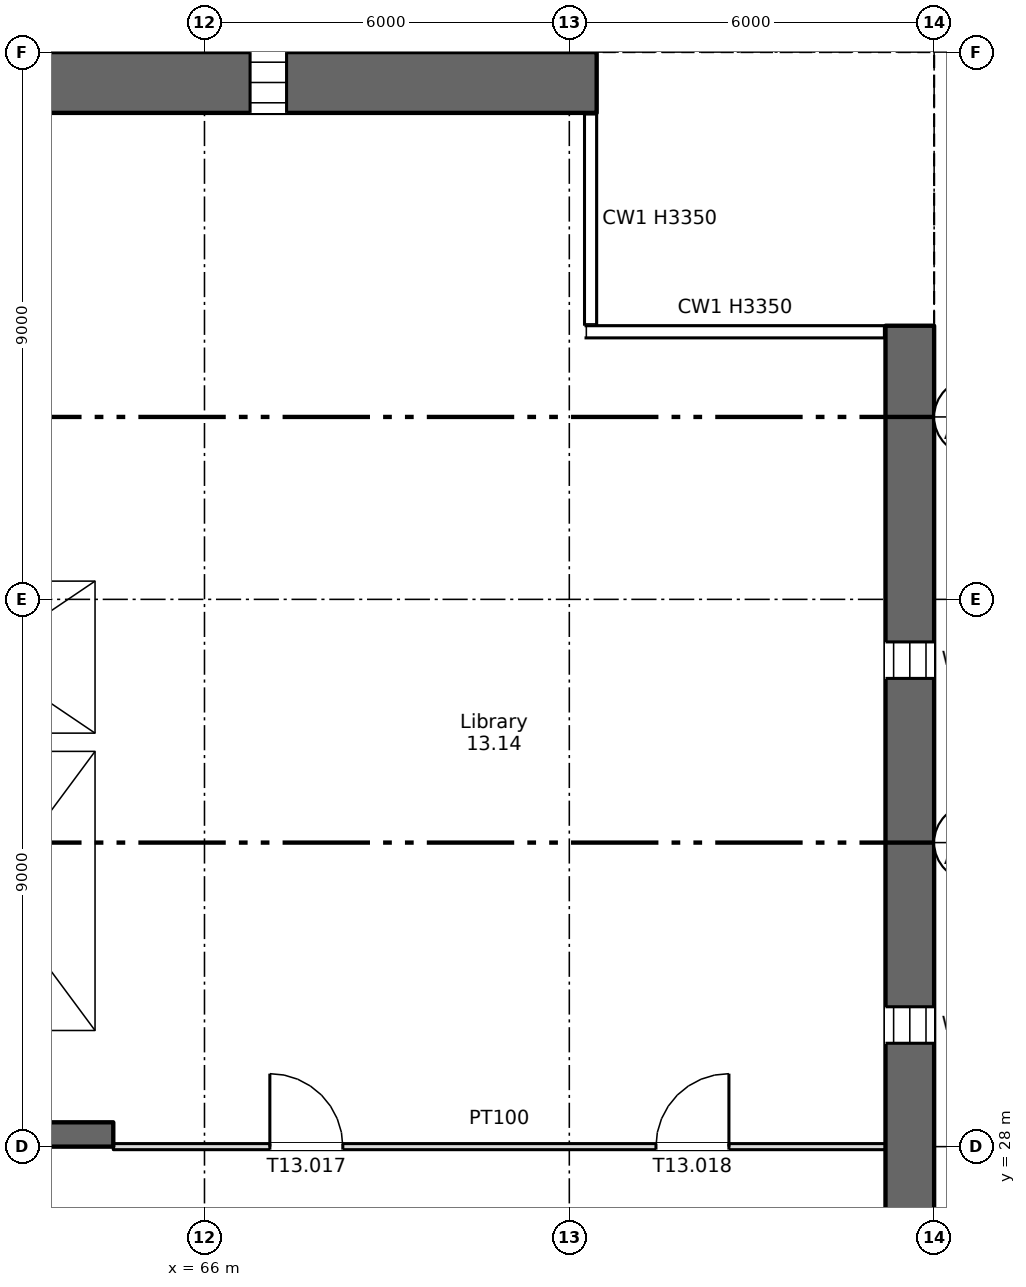
"""IFC4 building model, lengths in metres.
Left out: names, types, materials, properties, quantities, classifications, styles, units other than length and angle.
Written with IfcOpenShell. Run it as: python <this file> out.ifc"""

import sys

from ifc_helpers import new_model, si_unit, direction, frame, frame_2d, origin, place, context, subcontext, project, spatial, rectangle, extrude, element, fill, save


model = new_model("IFC4")
c1 = context("Model", 3, precision=1e-05, world=origin(), true_north=direction((0.0, 1.0)))
c2 = subcontext(c1, "Body", "Model", "MODEL_VIEW")
j1 = project(units=[si_unit("LENGTHUNIT", "METRE"), si_unit("PLANEANGLEUNIT", "RADIAN")], contexts=[c1])
p1 = place(None, origin())
s1 = spatial("IfcSite", under=j1, at=p1, CompositionType="ELEMENT")
p2 = place(p1, origin())
s2 = spatial("IfcBuilding", under=s1, at=p2, CompositionType="ELEMENT")
p3 = place(p2, frame((0.0, 0.0, 71.25)))
s3 = spatial("IfcBuildingStorey", under=s2, at=p3, CompositionType="ELEMENT", Elevation=71.25)
p4 = place(p3, frame((77.6, 4.5, 0.0), z_axis=(0.0, 0.0, 1.0), x_axis=(0.0, 1.0, 0.0)))
e1 = element("IfcWall", 1, at=p4, inside=s3, PredefinedType="SHEAR", context=c2, shape_type="SweptSolid", body=[
    extrude(rectangle(XDim=37.0, YDim=0.8, at=frame_2d((18.5, 0.0))), origin(), (0.0, 0.0, 1.0), 3.35),
])
p5 = place(p4, frame((1.2, 0.0, 0.6)))
e2 = element("IfcOpeningElement", 2, at=p5, cuts=e1, PredefinedType="OPENING", context=c2, shape_type="SweptSolid", body=[
    extrude(rectangle(XDim=0.6, YDim=2.4, at=frame_2d((0.3, 1.2))), frame((0.0, 0.41, 0.0), z_axis=(0.0, -1.0, 0.0), x_axis=(1.0, 0.0, 0.0)), (0.0, 0.0, 1.0), 0.82),
])
p6 = place(p4, frame((7.2, 0.0, 0.6)))
e3 = element("IfcOpeningElement", 3, at=p6, cuts=e1, PredefinedType="OPENING", context=c2, shape_type="SweptSolid", body=[
    extrude(rectangle(XDim=0.6, YDim=2.4, at=frame_2d((0.3, 1.2))), frame((0.0, 0.41, 0.0), z_axis=(0.0, -1.0, 0.0), x_axis=(1.0, 0.0, 0.0)), (0.0, 0.0, 1.0), 0.82),
])
p7 = place(p4, frame((13.2, 0.0, 0.6)))
e4 = element("IfcOpeningElement", 4, at=p7, cuts=e1, PredefinedType="OPENING", context=c2, shape_type="SweptSolid", body=[
    extrude(rectangle(XDim=0.6, YDim=2.4, at=frame_2d((0.3, 1.2))), frame((0.0, 0.41, 0.0), z_axis=(0.0, -1.0, 0.0), x_axis=(1.0, 0.0, 0.0)), (0.0, 0.0, 1.0), 0.82),
])
p8 = place(p4, frame((19.2, 0.0, 0.6)))
e5 = element("IfcOpeningElement", 5, at=p8, cuts=e1, PredefinedType="OPENING", context=c2, shape_type="SweptSolid", body=[
    extrude(rectangle(XDim=0.6, YDim=2.4, at=frame_2d((0.3, 1.2))), frame((0.0, 0.41, 0.0), z_axis=(0.0, -1.0, 0.0), x_axis=(1.0, 0.0, 0.0)), (0.0, 0.0, 1.0), 0.82),
])
p9 = place(p4, frame((25.2, 0.0, 0.6)))
e6 = element("IfcOpeningElement", 6, at=p9, cuts=e1, PredefinedType="OPENING", context=c2, shape_type="SweptSolid", body=[
    extrude(rectangle(XDim=0.6, YDim=2.4, at=frame_2d((0.3, 1.2))), frame((0.0, 0.41, 0.0), z_axis=(0.0, -1.0, 0.0), x_axis=(1.0, 0.0, 0.0)), (0.0, 0.0, 1.0), 0.82),
])
p10 = place(p4, frame((31.2, 0.0, 0.6)))
e7 = element("IfcOpeningElement", 7, at=p10, cuts=e1, PredefinedType="OPENING", context=c2, shape_type="SweptSolid", body=[
    extrude(rectangle(XDim=0.6, YDim=2.4, at=frame_2d((0.3, 1.2))), frame((0.0, 0.41, 0.0), z_axis=(0.0, -1.0, 0.0), x_axis=(1.0, 0.0, 0.0)), (0.0, 0.0, 1.0), 0.82),
])
p11 = place(p3, frame((5.55, 45.5, 0.0), z_axis=(0.0, 0.0, 1.0), x_axis=(1.0, 0.0, 0.0)))
e8 = element("IfcWall", 8, at=p11, inside=s3, PredefinedType="SHEAR", context=c2, shape_type="SweptSolid", body=[
    extrude(rectangle(XDim=66.9, YDim=1.0, at=frame_2d((33.45, 0.0))), origin(), (0.0, 0.0, 1.0), 3.35),
])
p12 = place(p11, frame((1.2, 0.0, 0.6)))
e9 = element("IfcOpeningElement", 9, at=p12, cuts=e8, PredefinedType="OPENING", context=c2, shape_type="SweptSolid", body=[
    extrude(rectangle(XDim=0.6, YDim=2.4, at=frame_2d((0.3, 1.2))), frame((0.0, 0.51, 0.0), z_axis=(0.0, -1.0, 0.0), x_axis=(1.0, 0.0, 0.0)), (0.0, 0.0, 1.0), 1.02),
])
p13 = place(p11, frame((7.2, 0.0, 0.6)))
e10 = element("IfcOpeningElement", 10, at=p13, cuts=e8, PredefinedType="OPENING", context=c2, shape_type="SweptSolid", body=[
    extrude(rectangle(XDim=0.6, YDim=2.4, at=frame_2d((0.3, 1.2))), frame((0.0, 0.51, 0.0), z_axis=(0.0, -1.0, 0.0), x_axis=(1.0, 0.0, 0.0)), (0.0, 0.0, 1.0), 1.02),
])
p14 = place(p11, frame((61.2, 0.0, 0.6)))
e11 = element("IfcOpeningElement", 11, at=p14, cuts=e8, PredefinedType="OPENING", context=c2, shape_type="SweptSolid", body=[
    extrude(rectangle(XDim=0.6, YDim=2.4, at=frame_2d((0.3, 1.2))), frame((0.0, 0.51, 0.0), z_axis=(0.0, -1.0, 0.0), x_axis=(1.0, 0.0, 0.0)), (0.0, 0.0, 1.0), 1.02),
])
p15 = place(p3, frame((6.7, 28.2, 0.0), z_axis=(0.0, 0.0, 1.0), x_axis=(1.0, 0.0, 0.0)))
e12 = element("IfcWall", 12, at=p15, inside=s3, PredefinedType="SHEAR", context=c2, shape_type="SweptSolid", body=[
    extrude(rectangle(XDim=57.8, YDim=0.4, at=frame_2d((28.9, 0.0))), origin(), (0.0, 0.0, 1.0), 3.35),
])
p16 = place(p15, frame((12.562, 0.0, 0.0)))
e13 = element("IfcOpeningElement", 13, at=p16, cuts=e12, PredefinedType="OPENING", context=c2, shape_type="SweptSolid", body=[
    extrude(rectangle(XDim=0.9, YDim=2.1, at=frame_2d((0.45, 1.05))), frame((0.0, 0.21, 0.0), z_axis=(0.0, -1.0, 0.0), x_axis=(1.0, 0.0, 0.0)), (0.0, 0.0, 1.0), 0.42),
])
p17 = place(p15, frame((15.137, 0.0, 0.0)))
e14 = element("IfcOpeningElement", 14, at=p17, cuts=e12, PredefinedType="OPENING", context=c2, shape_type="SweptSolid", body=[
    extrude(rectangle(XDim=0.9, YDim=2.1, at=frame_2d((0.45, 1.05))), frame((0.0, 0.21, 0.0), z_axis=(0.0, -1.0, 0.0), x_axis=(1.0, 0.0, 0.0)), (0.0, 0.0, 1.0), 0.42),
])
p18 = place(p15, frame((49.85, 0.0, 0.0)))
e15 = element("IfcOpeningElement", 15, at=p18, cuts=e12, PredefinedType="OPENING", context=c2, shape_type="SweptSolid", body=[
    extrude(rectangle(XDim=0.9, YDim=2.1, at=frame_2d((0.45, 1.05))), frame((0.0, 0.21, 0.0), z_axis=(0.0, -1.0, 0.0), x_axis=(1.0, 0.0, 0.0)), (0.0, 0.0, 1.0), 0.42),
])
p19 = place(p15, frame((0.562, 0.0, 0.0)))
e16 = element("IfcOpeningElement", 16, at=p19, cuts=e12, PredefinedType="OPENING", context=c2, shape_type="SweptSolid", body=[
    extrude(rectangle(XDim=0.9, YDim=2.1, at=frame_2d((0.45, 1.05))), frame((0.0, 0.21, 0.0), z_axis=(0.0, -1.0, 0.0), x_axis=(1.0, 0.0, 0.0)), (0.0, 0.0, 1.0), 0.42),
])
p20 = place(p15, frame((2.137, 0.0, 0.0)))
e17 = element("IfcOpeningElement", 17, at=p20, cuts=e12, PredefinedType="OPENING", context=c2, shape_type="SweptSolid", body=[
    extrude(rectangle(XDim=0.9, YDim=2.1, at=frame_2d((0.45, 1.05))), frame((0.0, 0.21, 0.0), z_axis=(0.0, -1.0, 0.0), x_axis=(1.0, 0.0, 0.0)), (0.0, 0.0, 1.0), 0.42),
])
p21 = place(p15, frame((4.7, 0.0, 0.0)))
e18 = element("IfcOpeningElement", 18, at=p21, cuts=e12, PredefinedType="OPENING", context=c2, shape_type="SweptSolid", body=[
    extrude(rectangle(XDim=1.2, YDim=2.1, at=frame_2d((0.6, 1.05))), frame((0.0, 0.21, 0.0), z_axis=(0.0, -1.0, 0.0), x_axis=(1.0, 0.0, 0.0)), (0.0, 0.0, 1.0), 0.42),
])
p22 = place(p15, frame((31.7, 0.0, 0.0)))
e19 = element("IfcOpeningElement", 19, at=p22, cuts=e12, PredefinedType="OPENING", context=c2, shape_type="SweptSolid", body=[
    extrude(rectangle(XDim=1.2, YDim=2.1, at=frame_2d((0.6, 1.05))), frame((0.0, 0.21, 0.0), z_axis=(0.0, -1.0, 0.0), x_axis=(1.0, 0.0, 0.0)), (0.0, 0.0, 1.0), 0.42),
])
p23 = place(p15, frame((55.2, 0.0, 0.0)))
e20 = element("IfcOpeningElement", 20, at=p23, cuts=e12, PredefinedType="OPENING", context=c2, shape_type="SweptSolid", body=[
    extrude(rectangle(XDim=1.2, YDim=2.1, at=frame_2d((0.6, 1.05))), frame((0.0, 0.21, 0.0), z_axis=(0.0, -1.0, 0.0), x_axis=(1.0, 0.0, 0.0)), (0.0, 0.0, 1.0), 0.42),
])
p24 = place(p15, frame((21.7, 0.0, 0.0)))
e21 = element("IfcOpeningElement", 21, at=p24, cuts=e12, PredefinedType="OPENING", context=c2, shape_type="SweptSolid", body=[
    extrude(rectangle(XDim=1.2, YDim=2.1, at=frame_2d((0.6, 1.05))), frame((0.0, 0.21, 0.0), z_axis=(0.0, -1.0, 0.0), x_axis=(1.0, 0.0, 0.0)), (0.0, 0.0, 1.0), 0.42),
])
p25 = place(p15, frame((41.7, 0.0, 0.0)))
e22 = element("IfcOpeningElement", 22, at=p25, cuts=e12, PredefinedType="OPENING", context=c2, shape_type="SweptSolid", body=[
    extrude(rectangle(XDim=1.2, YDim=2.1, at=frame_2d((0.6, 1.05))), frame((0.0, 0.21, 0.0), z_axis=(0.0, -1.0, 0.0), x_axis=(1.0, 0.0, 0.0)), (0.0, 0.0, 1.0), 0.42),
])
p26 = place(p15, frame((24.85, 0.0, 0.0)))
e23 = element("IfcOpeningElement", 23, at=p26, cuts=e12, PredefinedType="OPENING", context=c2, shape_type="SweptSolid", body=[
    extrude(rectangle(XDim=2.4, YDim=2.1, at=frame_2d((1.2, 1.05))), frame((0.0, 0.21, 0.0), z_axis=(0.0, -1.0, 0.0), x_axis=(1.0, 0.0, 0.0)), (0.0, 0.0, 1.0), 0.42),
])
p27 = place(p15, frame((37.35, 0.0, 0.0)))
e24 = element("IfcOpeningElement", 24, at=p27, cuts=e12, PredefinedType="OPENING", context=c2, shape_type="SweptSolid", body=[
    extrude(rectangle(XDim=2.4, YDim=2.1, at=frame_2d((1.2, 1.05))), frame((0.0, 0.21, 0.0), z_axis=(0.0, -1.0, 0.0), x_axis=(1.0, 0.0, 0.0)), (0.0, 0.0, 1.0), 0.42),
])
p28 = place(p15, frame((7.85, 0.0, 0.0)))
e25 = element("IfcOpeningElement", 25, at=p28, cuts=e12, PredefinedType="OPENING", context=c2, shape_type="SweptSolid", body=[
    extrude(rectangle(XDim=2.4, YDim=2.1, at=frame_2d((1.2, 1.05))), frame((0.0, 0.21, 0.0), z_axis=(0.0, -1.0, 0.0), x_axis=(1.0, 0.0, 0.0)), (0.0, 0.0, 1.0), 0.42),
])
p29 = place(p15, frame((28.85, 0.0, 0.0)))
e26 = element("IfcOpeningElement", 26, at=p29, cuts=e12, PredefinedType="OPENING", context=c2, shape_type="SweptSolid", body=[
    extrude(rectangle(XDim=0.9, YDim=2.1, at=frame_2d((0.45, 1.05))), frame((0.0, 0.21, 0.0), z_axis=(0.0, -1.0, 0.0), x_axis=(1.0, 0.0, 0.0)), (0.0, 0.0, 1.0), 0.42),
])
p30 = place(p15, frame((34.85, 0.0, 0.0)))
e27 = element("IfcOpeningElement", 27, at=p30, cuts=e12, PredefinedType="OPENING", context=c2, shape_type="SweptSolid", body=[
    extrude(rectangle(XDim=0.9, YDim=2.1, at=frame_2d((0.45, 1.05))), frame((0.0, 0.21, 0.0), z_axis=(0.0, -1.0, 0.0), x_axis=(1.0, 0.0, 0.0)), (0.0, 0.0, 1.0), 0.42),
])
p31 = place(p3, frame((64.35, 34.8, 0.0), z_axis=(0.0, 0.0, 1.0), x_axis=(0.0, 1.0, 0.0)))
e28 = element("IfcWall", 28, at=p31, inside=s3, PredefinedType="SHEAR", context=c2, shape_type="SweptSolid", body=[
    extrude(rectangle(XDim=10.2, YDim=0.3, at=frame_2d((5.1, 0.0))), origin(), (0.0, 0.0, 1.0), 3.35),
])
p32 = place(p3, frame((64.35, 28.4, 0.0), z_axis=(0.0, 0.0, 1.0), x_axis=(0.0, 1.0, 0.0)))
e29 = element("IfcWall", 29, at=p32, inside=s3, PredefinedType="SHEAR", context=c2, shape_type="SweptSolid", body=[
    extrude(rectangle(XDim=6.1, YDim=0.3, at=frame_2d((3.05, 0.0))), origin(), (0.0, 0.0, 1.0), 3.35),
])
p33 = place(p3, frame((60.5, 34.65, 0.0), z_axis=(0.0, 0.0, 1.0), x_axis=(1.0, 0.0, 0.0)))
e30 = element("IfcWall", 30, at=p33, inside=s3, PredefinedType="SHEAR", context=c2, shape_type="SweptSolid", body=[
    extrude(rectangle(XDim=4.0, YDim=0.3, at=frame_2d((2.0, 0.0))), origin(), (0.0, 0.0, 1.0), 3.35),
])
p34 = place(p3, frame((60.5, 37.45, 0.0), z_axis=(0.0, 0.0, 1.0), x_axis=(1.0, 0.0, 0.0)))
e31 = element("IfcWall", 31, at=p34, inside=s3, PredefinedType="SHEAR", context=c2, shape_type="SweptSolid", body=[
    extrude(rectangle(XDim=3.7, YDim=0.3, at=frame_2d((1.85, 0.0))), origin(), (0.0, 0.0, 1.0), 3.35),
])
p35 = place(p34, frame((1.3, 0.0, 0.0)))
e32 = element("IfcOpeningElement", 32, at=p35, cuts=e31, PredefinedType="OPENING", context=c2, shape_type="SweptSolid", body=[
    extrude(rectangle(XDim=1.1, YDim=2.1, at=frame_2d((0.55, 1.05))), frame((0.0, 0.16, 0.0), z_axis=(0.0, -1.0, 0.0), x_axis=(1.0, 0.0, 0.0)), (0.0, 0.0, 1.0), 0.32),
])
p36 = place(p3, frame((64.5, 28.0, 0.0), z_axis=(0.0, 0.0, 1.0), x_axis=(1.0, 0.0, 0.0)))
e33 = element("IfcWall", 33, at=p36, inside=s3, PredefinedType="PARTITIONING", context=c2, shape_type="SweptSolid", body=[
    extrude(rectangle(XDim=12.7, YDim=0.1, at=frame_2d((6.35, 0.0))), origin(), (0.0, 0.0, 1.0), 3.35),
])
p37 = place(p36, frame((2.575, 0.0, 0.0)))
e34 = element("IfcOpeningElement", 34, at=p37, cuts=e33, PredefinedType="OPENING", context=c2, shape_type="SweptSolid", body=[
    extrude(rectangle(XDim=1.2, YDim=2.1, at=frame_2d((0.6, 1.05))), frame((0.0, 0.06, 0.0), z_axis=(0.0, -1.0, 0.0), x_axis=(1.0, 0.0, 0.0)), (0.0, 0.0, 1.0), 0.12),
])
p38 = place(p36, frame((8.925, 0.0, 0.0)))
e35 = element("IfcOpeningElement", 35, at=p38, cuts=e33, PredefinedType="OPENING", context=c2, shape_type="SweptSolid", body=[
    extrude(rectangle(XDim=1.2, YDim=2.1, at=frame_2d((0.6, 1.05))), frame((0.0, 0.06, 0.0), z_axis=(0.0, -1.0, 0.0), x_axis=(1.0, 0.0, 0.0)), (0.0, 0.0, 1.0), 0.12),
])
p39 = place(p14, origin())
e36 = element("IfcWindow", 36, at=p39, inside=s3, PartitioningType="SINGLE_PANEL", PredefinedType="WINDOW", context=c2, shape_type="SweptSolid", body=[
    extrude(rectangle(XDim=0.6, YDim=2.4, at=frame_2d((0.3, 1.2))), frame((0.0, 0.03, 0.0), z_axis=(0.0, -1.0, 0.0), x_axis=(1.0, 0.0, 0.0)), (0.0, 0.0, 1.0), 0.06),
])
fill(e11, e36)
p40 = place(p9, origin())
e37 = element("IfcWindow", 37, at=p40, inside=s3, PartitioningType="SINGLE_PANEL", PredefinedType="WINDOW", context=c2, shape_type="SweptSolid", body=[
    extrude(rectangle(XDim=0.6, YDim=2.4, at=frame_2d((0.3, 1.2))), frame((0.0, 0.03, 0.0), z_axis=(0.0, -1.0, 0.0), x_axis=(1.0, 0.0, 0.0)), (0.0, 0.0, 1.0), 0.06),
])
fill(e6, e37)
p41 = place(p10, origin())
e38 = element("IfcWindow", 38, at=p41, inside=s3, PartitioningType="SINGLE_PANEL", PredefinedType="WINDOW", context=c2, shape_type="SweptSolid", body=[
    extrude(rectangle(XDim=0.6, YDim=2.4, at=frame_2d((0.3, 1.2))), frame((0.0, 0.03, 0.0), z_axis=(0.0, -1.0, 0.0), x_axis=(1.0, 0.0, 0.0)), (0.0, 0.0, 1.0), 0.06),
])
fill(e7, e38)
p42 = place(p37, origin())
e39 = element("IfcDoor", 39, at=p42, inside=s3, OperationType="SINGLE_SWING_LEFT", PredefinedType="DOOR", context=c2, shape_type="SweptSolid", body=[
    extrude(rectangle(XDim=1.2, YDim=2.1, at=frame_2d((0.6, 1.05))), frame((0.0, 0.025, 0.0), z_axis=(0.0, -1.0, 0.0), x_axis=(1.0, 0.0, 0.0)), (0.0, 0.0, 1.0), 0.05),
])
fill(e34, e39)
p43 = place(p38, origin())
e40 = element("IfcDoor", 40, at=p43, inside=s3, OperationType="SINGLE_SWING_RIGHT", PredefinedType="DOOR", context=c2, shape_type="SweptSolid", body=[
    extrude(rectangle(XDim=1.2, YDim=2.1, at=frame_2d((0.6, 1.05))), frame((0.0, 0.025, 0.0), z_axis=(0.0, -1.0, 0.0), x_axis=(1.0, 0.0, 0.0)), (0.0, 0.0, 1.0), 0.05),
])
fill(e35, e40)
save(model, sys.argv[1])
